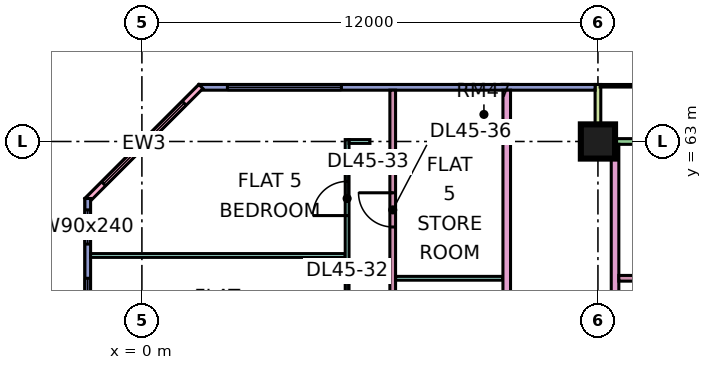
"""IFC4 building model, lengths in metres.
Left out: names, types, materials, properties, quantities, classifications, styles, units other than length and angle.
Written with IfcOpenShell. Run it as: python <this file> out.ifc"""

import sys

from ifc_helpers import new_model, si_unit, direction, frame, frame_2d, origin, origin_2d, place, context, subcontext, project, spatial, rectangle, extrude, element, fill, save


model = new_model("IFC4")
c1 = context("Model", 3, precision=1e-05, world=origin(), true_north=direction((0.0, 1.0)))
c2 = subcontext(c1, "Body", "Model", "MODEL_VIEW")
j1 = project(units=[si_unit("LENGTHUNIT", "METRE"), si_unit("PLANEANGLEUNIT", "RADIAN")], contexts=[c1])
p1 = place(None, origin())
s1 = spatial("IfcSite", under=j1, at=p1, CompositionType="ELEMENT")
p2 = place(p1, origin())
s2 = spatial("IfcBuilding", under=s1, at=p2, CompositionType="ELEMENT")
p3 = place(p2, frame((0.0, 0.0, 194.9)))
s3 = spatial("IfcBuildingStorey", under=s2, at=p3, CompositionType="ELEMENT", Elevation=194.9)
p4 = place(p3, frame((12.0, 63.0, 0.0), z_axis=(0.0, 0.0, 1.0), x_axis=(1.0, 0.0, 0.0)))
e1 = element("IfcColumn", 1, at=p4, inside=s3, PredefinedType="COLUMN", context=c2, shape_type="SweptSolid", body=[
    extrude(rectangle(XDim=0.9, YDim=0.9, at=origin_2d()), origin(), (0.0, 0.0, 1.0), 3.75),
])
p5 = place(p3, frame((22.425, 63.0, 0.0), z_axis=(0.0, 0.0, 1.0), x_axis=(-1.0, 0.0, 0.0)))
e2 = element("IfcWall", 2, at=p5, inside=s3, PredefinedType="SOLIDWALL", context=c2, shape_type="SweptSolid", body=[
    extrude(rectangle(XDim=10.35, YDim=0.15, at=frame_2d((5.175, 0.0))), origin(), (0.0, 0.0, 1.0), 3.35),
])
p6 = place(p5, frame((0.788, 0.0, 0.0)))
e3 = element("IfcOpeningElement", 3, at=p6, cuts=e2, PredefinedType="OPENING", context=c2, shape_type="SweptSolid", body=[
    extrude(rectangle(XDim=1.8, YDim=2.4, at=frame_2d((0.9, 1.2))), frame((0.0, 0.085, 0.0), z_axis=(0.0, -1.0, 0.0), x_axis=(1.0, 0.0, 0.0)), (0.0, 0.0, 1.0), 0.17),
])
p7 = place(p5, frame((5.725, 0.0, 0.45)))
e4 = element("IfcOpeningElement", 4, at=p7, cuts=e2, PredefinedType="OPENING", context=c2, shape_type="SweptSolid", body=[
    extrude(rectangle(XDim=3.0, YDim=2.4, at=frame_2d((1.5, 1.2))), frame((0.0, 0.085, 0.0), z_axis=(0.0, -1.0, 0.0), x_axis=(1.0, 0.0, 0.0)), (0.0, 0.0, 1.0), 0.17),
])
p8 = place(p3, frame((12.0, 64.5, 0.0), z_axis=(0.0, 0.0, 1.0), x_axis=(0.0, -1.0, 0.0)))
e5 = element("IfcWall", 5, at=p8, inside=s3, PredefinedType="SOLIDWALL", context=c2, shape_type="SweptSolid", body=[
    extrude(rectangle(XDim=1.5, YDim=0.15, at=frame_2d((0.75, 0.0))), origin(), (0.0, 0.0, 1.0), 3.35),
])
p9 = place(p3, frame((11.925, 64.425, 0.0), z_axis=(0.0, 0.0, 1.0), x_axis=(-1.0, 0.0, 0.0)))
e6 = element("IfcWall", 6, at=p9, inside=s3, PredefinedType="SOLIDWALL", context=c2, shape_type="SweptSolid", body=[
    extrude(rectangle(XDim=10.425, YDim=0.15, at=frame_2d((5.212, 0.0))), origin(), (0.0, 0.0, 1.0), 3.35),
])
p10 = place(p9, frame((6.675, 0.0, 0.45)))
e7 = element("IfcOpeningElement", 7, at=p10, cuts=e6, PredefinedType="OPENING", context=c2, shape_type="SweptSolid", body=[
    extrude(rectangle(XDim=3.0, YDim=2.4, at=frame_2d((1.5, 1.2))), frame((0.0, 0.085, 0.0), z_axis=(0.0, -1.0, 0.0), x_axis=(1.0, 0.0, 0.0)), (0.0, 0.0, 1.0), 0.17),
])
p11 = place(p3, frame((1.553, 64.447, 0.0), z_axis=(0.0, 0.0, 1.0), x_axis=(-0.707106781187, -0.707106781187, 0.0)))
e8 = element("IfcWall", 8, at=p11, inside=s3, PredefinedType="SOLIDWALL", context=c2, shape_type="SweptSolid", body=[
    extrude(rectangle(XDim=4.243, YDim=0.15, at=frame_2d((2.121, 0.0))), origin(), (0.0, 0.0, 1.0), 3.35),
])
p12 = place(p11, frame((0.621, 0.0, 0.45)))
e9 = element("IfcOpeningElement", 9, at=p12, cuts=e8, PredefinedType="OPENING", context=c2, shape_type="SweptSolid", body=[
    extrude(rectangle(XDim=3.0, YDim=2.4, at=frame_2d((1.5, 1.2))), frame((0.0, 0.085, 0.0), z_axis=(0.0, -1.0, 0.0), x_axis=(1.0, 0.0, 0.0)), (0.0, 0.0, 1.0), 0.17),
])
p13 = place(p3, frame((-1.425, 61.5, 0.0), z_axis=(0.0, 0.0, 1.0), x_axis=(0.0, -1.0, 0.0)))
e10 = element("IfcWall", 10, at=p13, inside=s3, PredefinedType="SOLIDWALL", context=c2, shape_type="SweptSolid", body=[
    extrude(rectangle(XDim=13.425, YDim=0.15, at=frame_2d((6.712, 0.0))), origin(), (0.0, 0.0, 1.0), 3.35),
])
p14 = place(p13, frame((0.3, 0.0, 0.45)))
e11 = element("IfcOpeningElement", 11, at=p14, cuts=e10, PredefinedType="OPENING", context=c2, shape_type="SweptSolid", body=[
    extrude(rectangle(XDim=0.9, YDim=2.4, at=frame_2d((0.45, 1.2))), frame((0.0, 0.085, 0.0), z_axis=(0.0, -1.0, 0.0), x_axis=(1.0, 0.0, 0.0)), (0.0, 0.0, 1.0), 0.17),
])
p15 = place(p13, frame((2.1, 0.0, 0.45)))
e12 = element("IfcOpeningElement", 12, at=p15, cuts=e10, PredefinedType="OPENING", context=c2, shape_type="SweptSolid", body=[
    extrude(rectangle(XDim=1.8, YDim=2.4, at=frame_2d((0.9, 1.2))), frame((0.0, 0.085, 0.0), z_axis=(0.0, -1.0, 0.0), x_axis=(1.0, 0.0, 0.0)), (0.0, 0.0, 1.0), 0.17),
])
p16 = place(p13, frame((5.1, 0.0, 0.45)))
e13 = element("IfcOpeningElement", 13, at=p16, cuts=e10, PredefinedType="OPENING", context=c2, shape_type="SweptSolid", body=[
    extrude(rectangle(XDim=4.8, YDim=2.4, at=frame_2d((2.4, 1.2))), frame((0.0, 0.085, 0.0), z_axis=(0.0, -1.0, 0.0), x_axis=(1.0, 0.0, 0.0)), (0.0, 0.0, 1.0), 0.17),
])
p17 = place(p13, frame((11.062, 0.0, 0.45)))
e14 = element("IfcOpeningElement", 14, at=p17, cuts=e10, PredefinedType="OPENING", context=c2, shape_type="SweptSolid", body=[
    extrude(rectangle(XDim=1.8, YDim=2.4, at=frame_2d((0.9, 1.2))), frame((0.0, 0.085, 0.0), z_axis=(0.0, -1.0, 0.0), x_axis=(1.0, 0.0, 0.0)), (0.0, 0.0, 1.0), 0.17),
])
p18 = place(p3, frame((-1.351, 60.0, 0.0), z_axis=(0.0, 0.0, 1.0), x_axis=(1.0, 0.0, 0.0)))
e15 = element("IfcWall", 15, at=p18, inside=s3, PredefinedType="PARTITIONING", context=c2, shape_type="SweptSolid", body=[
    extrude(rectangle(XDim=6.701, YDim=0.1, at=frame_2d((3.351, 0.0))), origin(), (0.0, 0.0, 1.0), 3.35),
])
p19 = place(p3, frame((5.4, 56.95, 0.0), z_axis=(0.0, 0.0, 1.0), x_axis=(0.0, 1.0, 0.0)))
e16 = element("IfcWall", 16, at=p19, inside=s3, PredefinedType="PARTITIONING", context=c2, shape_type="SweptSolid", body=[
    extrude(rectangle(XDim=6.1, YDim=0.1, at=frame_2d((3.05, 0.0))), origin(), (0.0, 0.0, 1.0), 3.35),
])
p20 = place(p19, frame((1.1, 0.0, 0.0)))
e17 = element("IfcOpeningElement", 17, at=p20, cuts=e16, PredefinedType="OPENING", context=c2, shape_type="SweptSolid", body=[
    extrude(rectangle(XDim=0.9, YDim=2.1, at=frame_2d((0.45, 1.05))), frame((0.0, 0.06, 0.0), z_axis=(0.0, -1.0, 0.0), x_axis=(1.0, 0.0, 0.0)), (0.0, 0.0, 1.0), 0.12),
])
p21 = place(p19, frame((4.1, 0.0, 0.0)))
e18 = element("IfcOpeningElement", 18, at=p21, cuts=e16, PredefinedType="OPENING", context=c2, shape_type="SweptSolid", body=[
    extrude(rectangle(XDim=0.9, YDim=2.1, at=frame_2d((0.45, 1.05))), frame((0.0, 0.06, 0.0), z_axis=(0.0, -1.0, 0.0), x_axis=(1.0, 0.0, 0.0)), (0.0, 0.0, 1.0), 0.12),
])
p22 = place(p3, frame((5.45, 63.0, 0.0), z_axis=(0.0, 0.0, 1.0), x_axis=(1.0, 0.0, 0.0)))
e19 = element("IfcWall", 19, at=p22, inside=s3, PredefinedType="PARTITIONING", context=c2, shape_type="SweptSolid", body=[
    extrude(rectangle(XDim=0.55, YDim=0.1, at=frame_2d((0.275, 0.0))), origin(), (0.0, 0.0, 1.0), 3.35),
])
p23 = place(p3, frame((6.6, 51.225, 0.0), z_axis=(0.0, 0.0, 1.0), x_axis=(0.0, 1.0, 0.0)))
e20 = element("IfcWall", 20, at=p23, inside=s3, PredefinedType="PARTITIONING", context=c2, shape_type="SweptSolid", body=[
    extrude(rectangle(XDim=13.125, YDim=0.15, at=frame_2d((6.562, 0.0))), origin(), (0.0, 0.0, 1.0), 3.35),
])
p24 = place(p23, frame((4.725, 0.0, 0.0)))
e21 = element("IfcOpeningElement", 21, at=p24, cuts=e20, PredefinedType="OPENING", context=c2, shape_type="SweptSolid", body=[
    extrude(rectangle(XDim=0.9, YDim=2.1, at=frame_2d((0.45, 1.05))), frame((0.0, 0.085, 0.0), z_axis=(0.0, -1.0, 0.0), x_axis=(1.0, 0.0, 0.0)), (0.0, 0.0, 1.0), 0.17),
])
p25 = place(p23, frame((9.525, 0.0, 0.0)))
e22 = element("IfcOpeningElement", 22, at=p25, cuts=e20, PredefinedType="OPENING", context=c2, shape_type="SweptSolid", body=[
    extrude(rectangle(XDim=0.9, YDim=2.1, at=frame_2d((0.45, 1.05))), frame((0.0, 0.085, 0.0), z_axis=(0.0, -1.0, 0.0), x_axis=(1.0, 0.0, 0.0)), (0.0, 0.0, 1.0), 0.17),
])
p26 = place(p3, frame((6.675, 59.4, 0.0), z_axis=(0.0, 0.0, 1.0), x_axis=(1.0, 0.0, 0.0)))
e23 = element("IfcWall", 23, at=p26, inside=s3, PredefinedType="PARTITIONING", context=c2, shape_type="SweptSolid", body=[
    extrude(rectangle(XDim=2.825, YDim=0.1, at=frame_2d((1.413, 0.0))), origin(), (0.0, 0.0, 1.0), 3.35),
])
p27 = place(p3, frame((9.6, 20.0, 0.0), z_axis=(0.0, 0.0, 1.0), x_axis=(0.0, 1.0, 0.0)))
e24 = element("IfcWall", 24, at=p27, inside=s3, PredefinedType="PARTITIONING", context=c2, shape_type="SweptSolid", body=[
    extrude(rectangle(XDim=44.35, YDim=0.2, at=frame_2d((22.175, 0.0))), origin(), (0.0, 0.0, 1.0), 3.35),
])
p28 = place(p27, frame((17.1, 0.0, 0.0)))
e25 = element("IfcOpeningElement", 25, at=p28, cuts=e24, PredefinedType="OPENING", context=c2, shape_type="SweptSolid", body=[
    extrude(rectangle(XDim=1.0, YDim=2.1, at=frame_2d((0.5, 1.05))), frame((0.0, 0.11, 0.0), z_axis=(0.0, -1.0, 0.0), x_axis=(1.0, 0.0, 0.0)), (0.0, 0.0, 1.0), 0.22),
])
p29 = place(p27, frame((29.1, 0.0, 0.0)))
e26 = element("IfcOpeningElement", 26, at=p29, cuts=e24, PredefinedType="OPENING", context=c2, shape_type="SweptSolid", body=[
    extrude(rectangle(XDim=1.0, YDim=2.1, at=frame_2d((0.5, 1.05))), frame((0.0, 0.11, 0.0), z_axis=(0.0, -1.0, 0.0), x_axis=(1.0, 0.0, 0.0)), (0.0, 0.0, 1.0), 0.22),
])
p30 = place(p27, frame((0.6, 0.0, 0.0)))
e27 = element("IfcOpeningElement", 27, at=p30, cuts=e24, PredefinedType="OPENING", context=c2, shape_type="SweptSolid", body=[
    extrude(rectangle(XDim=1.2, YDim=2.1, at=frame_2d((0.6, 1.05))), frame((0.0, 0.11, 0.0), z_axis=(0.0, -1.0, 0.0), x_axis=(1.0, 0.0, 0.0)), (0.0, 0.0, 1.0), 0.22),
])
p31 = place(p27, frame((4.35, 0.0, 0.0)))
e28 = element("IfcOpeningElement", 28, at=p31, cuts=e24, PredefinedType="OPENING", context=c2, shape_type="SweptSolid", body=[
    extrude(rectangle(XDim=1.0, YDim=2.1, at=frame_2d((0.5, 1.05))), frame((0.0, 0.11, 0.0), z_axis=(0.0, -1.0, 0.0), x_axis=(1.0, 0.0, 0.0)), (0.0, 0.0, 1.0), 0.22),
])
p32 = place(p3, frame((12.45, 20.0, 0.0), z_axis=(0.0, 0.0, 1.0), x_axis=(0.0, 1.0, 0.0)))
e29 = element("IfcWall", 29, at=p32, inside=s3, PredefinedType="PARTITIONING", context=c2, shape_type="SweptSolid", body=[
    extrude(rectangle(XDim=42.926, YDim=0.2, at=frame_2d((21.463, 0.0))), origin(), (0.0, 0.0, 1.0), 3.35),
])
p33 = place(p32, frame((7.15, 0.0, 0.0)))
e30 = element("IfcOpeningElement", 30, at=p33, cuts=e29, PredefinedType="OPENING", context=c2, shape_type="SweptSolid", body=[
    extrude(rectangle(XDim=1.6, YDim=2.1, at=frame_2d((0.8, 1.05))), frame((0.0, 0.11, 0.0), z_axis=(0.0, -1.0, 0.0), x_axis=(1.0, 0.0, 0.0)), (0.0, 0.0, 1.0), 0.22),
])
p34 = place(p32, frame((13.5, 0.0, 0.0)))
e31 = element("IfcOpeningElement", 31, at=p34, cuts=e29, PredefinedType="OPENING", context=c2, shape_type="SweptSolid", body=[
    extrude(rectangle(XDim=1.0, YDim=2.1, at=frame_2d((0.5, 1.05))), frame((0.0, 0.11, 0.0), z_axis=(0.0, -1.0, 0.0), x_axis=(1.0, 0.0, 0.0)), (0.0, 0.0, 1.0), 0.22),
])
p35 = place(p32, frame((17.2, 0.0, 0.0)))
e32 = element("IfcOpeningElement", 32, at=p35, cuts=e29, PredefinedType="OPENING", context=c2, shape_type="SweptSolid", body=[
    extrude(rectangle(XDim=1.0, YDim=2.1, at=frame_2d((0.5, 1.05))), frame((0.0, 0.11, 0.0), z_axis=(0.0, -1.0, 0.0), x_axis=(1.0, 0.0, 0.0)), (0.0, 0.0, 1.0), 0.22),
])
p36 = place(p32, frame((35.2, 0.0, 0.0)))
e33 = element("IfcOpeningElement", 33, at=p36, cuts=e29, PredefinedType="OPENING", context=c2, shape_type="SweptSolid", body=[
    extrude(rectangle(XDim=1.0, YDim=2.1, at=frame_2d((0.5, 1.05))), frame((0.0, 0.11, 0.0), z_axis=(0.0, -1.0, 0.0), x_axis=(1.0, 0.0, 0.0)), (0.0, 0.0, 1.0), 0.22),
])
p37 = place(p32, frame((1.15, 0.0, 0.0)))
e34 = element("IfcOpeningElement", 34, at=p37, cuts=e29, PredefinedType="OPENING", context=c2, shape_type="SweptSolid", body=[
    extrude(rectangle(XDim=1.8, YDim=2.1, at=frame_2d((0.9, 1.05))), frame((0.0, 0.11, 0.0), z_axis=(0.0, -1.0, 0.0), x_axis=(1.0, 0.0, 0.0)), (0.0, 0.0, 1.0), 0.22),
])
p38 = place(p32, frame((28.6, 0.0, 0.0)))
e35 = element("IfcOpeningElement", 35, at=p38, cuts=e29, PredefinedType="OPENING", context=c2, shape_type="SweptSolid", body=[
    extrude(rectangle(XDim=1.8, YDim=2.1, at=frame_2d((0.9, 1.05))), frame((0.0, 0.11, 0.0), z_axis=(0.0, -1.0, 0.0), x_axis=(1.0, 0.0, 0.0)), (0.0, 0.0, 1.0), 0.22),
])
p39 = place(p3, frame((12.55, 59.4, 0.0), z_axis=(0.0, 0.0, 1.0), x_axis=(1.0, 0.0, 0.0)))
e36 = element("IfcWall", 36, at=p39, inside=s3, PredefinedType="PARTITIONING", context=c2, shape_type="SweptSolid", body=[
    extrude(rectangle(XDim=5.225, YDim=0.15, at=frame_2d((2.612, 0.0))), origin(), (0.0, 0.0, 1.0), 3.35),
])
p40 = place(p10, origin())
e37 = element("IfcWindow", 37, at=p40, inside=s3, PartitioningType="SINGLE_PANEL", PredefinedType="WINDOW", context=c2, shape_type="SweptSolid", body=[
    extrude(rectangle(XDim=3.0, YDim=2.4, at=frame_2d((1.5, 1.2))), frame((0.0, 0.03, 0.0), z_axis=(0.0, -1.0, 0.0), x_axis=(1.0, 0.0, 0.0)), (0.0, 0.0, 1.0), 0.06),
])
fill(e7, e37)
p41 = place(p12, origin())
e38 = element("IfcWindow", 38, at=p41, inside=s3, PartitioningType="SINGLE_PANEL", PredefinedType="WINDOW", context=c2, shape_type="SweptSolid", body=[
    extrude(rectangle(XDim=3.0, YDim=2.4, at=frame_2d((1.5, 1.2))), frame((0.0, 0.03, 0.0), z_axis=(0.0, -1.0, 0.0), x_axis=(1.0, 0.0, 0.0)), (0.0, 0.0, 1.0), 0.06),
])
fill(e9, e38)
p42 = place(p14, origin())
e39 = element("IfcWindow", 39, at=p42, inside=s3, PartitioningType="SINGLE_PANEL", PredefinedType="WINDOW", context=c2, shape_type="SweptSolid", body=[
    extrude(rectangle(XDim=0.9, YDim=2.4, at=frame_2d((0.45, 1.2))), frame((0.0, 0.03, 0.0), z_axis=(0.0, -1.0, 0.0), x_axis=(1.0, 0.0, 0.0)), (0.0, 0.0, 1.0), 0.06),
])
fill(e11, e39)
p43 = place(p15, origin())
e40 = element("IfcWindow", 40, at=p43, inside=s3, PartitioningType="SINGLE_PANEL", PredefinedType="WINDOW", context=c2, shape_type="SweptSolid", body=[
    extrude(rectangle(XDim=1.8, YDim=2.4, at=frame_2d((0.9, 1.2))), frame((0.0, 0.03, 0.0), z_axis=(0.0, -1.0, 0.0), x_axis=(1.0, 0.0, 0.0)), (0.0, 0.0, 1.0), 0.06),
])
fill(e12, e40)
p44 = place(p21, origin())
e41 = element("IfcDoor", 41, at=p44, inside=s3, OperationType="SINGLE_SWING_LEFT", PredefinedType="DOOR", context=c2, shape_type="SweptSolid", body=[
    extrude(rectangle(XDim=0.9, YDim=2.1, at=frame_2d((0.45, 1.05))), frame((0.0, 0.025, 0.0), z_axis=(0.0, -1.0, 0.0), x_axis=(1.0, 0.0, 0.0)), (0.0, 0.0, 1.0), 0.05),
])
fill(e18, e41)
p45 = place(p25, frame((0.9, 0.0, 0.0), z_axis=(0.0, 0.0, 1.0), x_axis=(-1.0, 0.0, 0.0)))
e42 = element("IfcDoor", 42, at=p45, inside=s3, OperationType="SINGLE_SWING_RIGHT", PredefinedType="DOOR", context=c2, shape_type="SweptSolid", body=[
    extrude(rectangle(XDim=0.9, YDim=2.1, at=frame_2d((0.45, 1.05))), frame((0.0, 0.025, 0.0), z_axis=(0.0, -1.0, 0.0), x_axis=(1.0, 0.0, 0.0)), (0.0, 0.0, 1.0), 0.05),
])
fill(e22, e42)
save(model, sys.argv[1])
